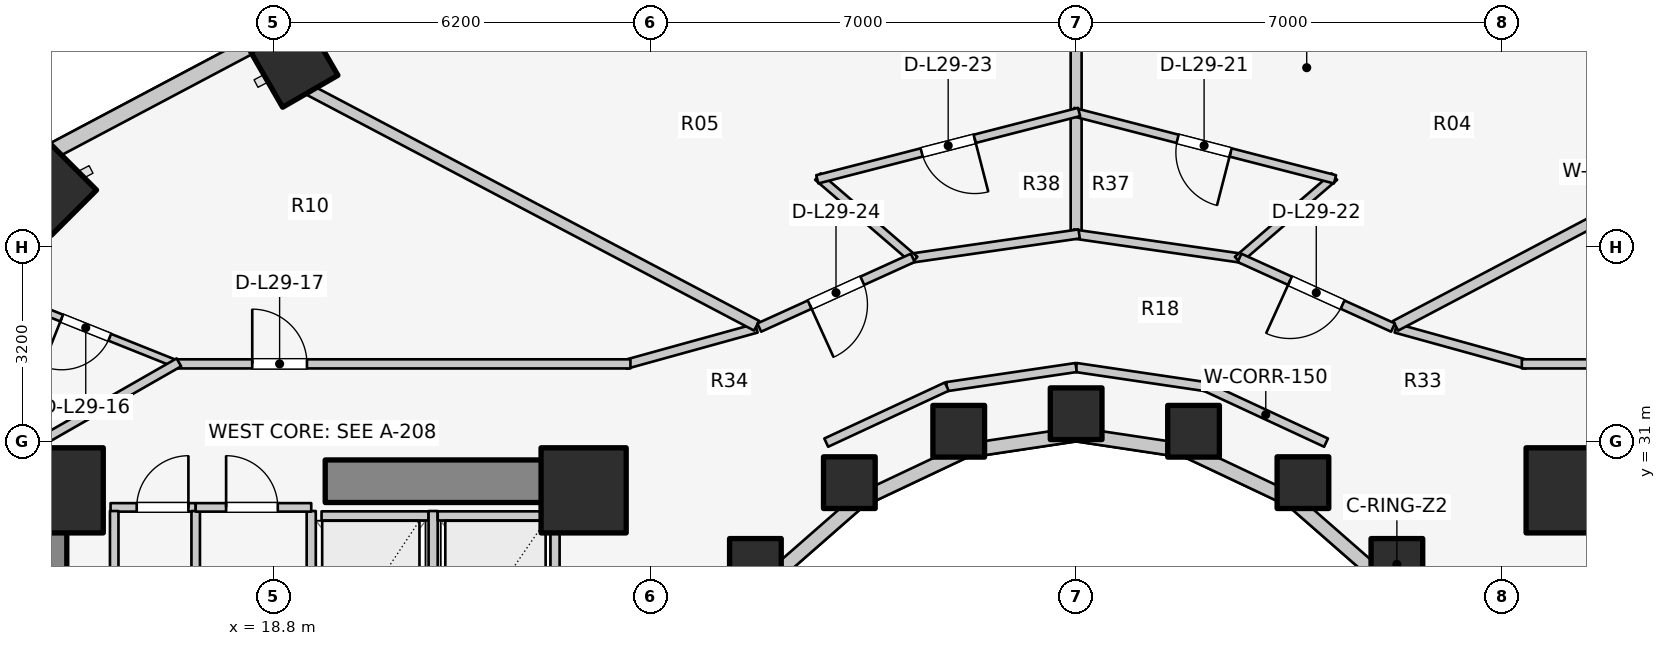
"""IFC4 building model, lengths in metres.
Left out: names, types, materials, properties, quantities, classifications, styles, units other than length and angle.
Written with IfcOpenShell. Run it as: python <this file> out.ifc"""

import sys

from ifc_helpers import new_model, si_unit, direction, frame, frame_2d, origin, origin_2d, place, context, subcontext, project, spatial, rectangle, extrude, element, fill, save


model = new_model("IFC4")
c1 = context("Model", 3, precision=1e-05, world=origin(), true_north=direction((0.0, 1.0)))
c2 = subcontext(c1, "Body", "Model", "MODEL_VIEW")
j1 = project(units=[si_unit("LENGTHUNIT", "METRE"), si_unit("PLANEANGLEUNIT", "RADIAN")], contexts=[c1])
p1 = place(None, origin())
s1 = spatial("IfcSite", under=j1, at=p1, CompositionType="ELEMENT")
p2 = place(p1, origin())
s2 = spatial("IfcBuilding", under=s1, at=p2, CompositionType="ELEMENT")
p3 = place(p2, frame((0.0, 0.0, 98.0)))
s3 = spatial("IfcBuildingStorey", under=s2, at=p3, CompositionType="ELEMENT", Elevation=98.0)
p4 = place(p3, frame((15.05, 17.05, 0.0), z_axis=(0.0, 0.0, 1.0), x_axis=(0.0, 1.0, 0.0)))
e1 = element("IfcWall", 1, at=p4, inside=s3, PredefinedType="SHEAR", context=c2, shape_type="SweptSolid", body=[
    extrude(rectangle(XDim=12.8, YDim=0.7, at=frame_2d((6.4, 0.0))), origin(), (0.0, 0.0, 1.0), 3.1),
])
for number, where, z_axis, x_axis in (
    (2, (19.65, 30.35, 0.0), (0.0, 0.0, 1.0), (1.0, 0.0, 0.0)),
    (3, (39.85, 30.35, 0.0), (0.0, 0.0, 1.0), (1.0, 0.0, 0.0)),
):
    element("IfcWall", number, at=place(p3, frame(where, z_axis=z_axis, x_axis=x_axis)), inside=s3, PredefinedType="SHEAR", context=c2, shape_type="SweptSolid", body=[
        extrude(rectangle(XDim=4.5, YDim=0.7, at=frame_2d((2.25, 0.0))), origin(), (0.0, 0.0, 1.0), 3.1),
    ])
for number, where, z_axis, x_axis in (
    (4, (23.9, 30.2, 0.0), (0.0, 0.0, 1.0), (1.0, 0.0, 0.0)),
    (5, (15.3, 30.2, 0.0), (0.0, 0.0, 1.0), (1.0, 0.0, 0.0)),
    (6, (40.1, 30.2, 0.0), (0.0, 0.0, 1.0), (1.0, 0.0, 0.0)),
):
    element("IfcColumn", number, at=place(p3, frame(where, z_axis=z_axis, x_axis=x_axis)), inside=s3, PredefinedType="COLUMN", context=c2, shape_type="SweptSolid", body=[
        extrude(rectangle(XDim=1.4, YDim=1.4, at=origin_2d()), origin(), (0.0, 0.0, 1.0), 3.1),
    ])
for number, where, z_axis, x_axis in (
    (7, (37.275, 28.982, 0.0), (0.0, 0.0, 1.0), (1.0, 0.0, 0.0)),
    (8, (35.73, 30.327, 0.0), (0.0, 0.0, 1.0), (1.0, 0.0, 0.0)),
    (9, (33.931, 31.172, 0.0), (0.0, 0.0, 1.0), (1.0, 0.0, 0.0)),
    (10, (32.0, 31.46, 0.0), (0.0, 0.0, 1.0), (1.0, 0.0, 0.0)),
    (11, (30.069, 31.172, 0.0), (0.0, 0.0, 1.0), (1.0, 0.0, 0.0)),
    (12, (28.27, 30.327, 0.0), (0.0, 0.0, 1.0), (1.0, 0.0, 0.0)),
):
    element("IfcColumn", number, at=place(p3, frame(where, z_axis=z_axis, x_axis=x_axis)), inside=s3, PredefinedType="COLUMN", context=c2, shape_type="SweptSolid", body=[
        extrude(rectangle(XDim=0.85, YDim=0.85, at=origin_2d()), origin(), (0.0, 0.0, 1.0), 3.1),
    ])
p5 = place(p3, frame((19.142, 37.218, 0.0), z_axis=(0.0, 0.0, 1.0), x_axis=(-0.5, 0.866025403784, 0.0)))
e13 = element("IfcColumn", 13, at=p5, inside=s3, PredefinedType="COLUMN", context=c2, shape_type="SweptSolid", body=[
    extrude(rectangle(XDim=1.05, YDim=1.05, at=origin_2d()), origin(), (0.0, 0.0, 1.0), 3.1),
])
p6 = place(p3, frame((26.725, 28.982, 0.0), z_axis=(0.0, 0.0, 1.0), x_axis=(1.0, 0.0, 0.0)))
e14 = element("IfcColumn", 14, at=p6, inside=s3, PredefinedType="COLUMN", context=c2, shape_type="SweptSolid", body=[
    extrude(rectangle(XDim=0.85, YDim=0.85, at=origin_2d()), origin(), (0.0, 0.0, 1.0), 3.1),
])
p7 = place(p3, frame((15.147, 35.138, 0.0), z_axis=(0.0, 0.0, 1.0), x_axis=(-0.707106781187, 0.707106781187, 0.0)))
e15 = element("IfcColumn", 15, at=p7, inside=s3, PredefinedType="COLUMN", context=c2, shape_type="SweptSolid", body=[
    extrude(rectangle(XDim=1.05, YDim=1.05, at=origin_2d()), origin(), (0.0, 0.0, 1.0), 3.1),
])
p8 = place(p3, frame((37.035, 28.742, 0.0), z_axis=(0.0, 0.0, 1.0), x_axis=(-0.752576694707, 0.658504607869, 0.0)))
e16 = element("IfcWall", 16, at=p8, inside=s3, PredefinedType="STANDARD", context=c2, shape_type="SweptSolid", body=[
    extrude(rectangle(XDim=1.959, YDim=0.23, at=frame_2d((0.98, 0.0))), origin(), (0.0, 0.0, 1.0), 2.16),
])
p9 = place(p3, frame((35.56, 30.032, 0.0), z_axis=(0.0, 0.0, 1.0), x_axis=(-0.904179699603, 0.427152280606, 0.0)))
e17 = element("IfcWall", 17, at=p9, inside=s3, PredefinedType="STANDARD", context=c2, shape_type="SweptSolid", body=[
    extrude(rectangle(XDim=1.899, YDim=0.23, at=frame_2d((0.95, 0.0))), origin(), (0.0, 0.0, 1.0), 2.16),
])
for number, where, z_axis, x_axis in (
    (18, (33.843, 30.843, 0.0), (0.0, 0.0, 1.0), (-0.989, 0.149, 0.0)),
    (19, (32.0, 31.12, 0.0), (0.0, 0.0, 1.0), (-0.989, -0.149, 0.0)),
):
    element("IfcWall", number, at=place(p3, frame(where, z_axis=z_axis, x_axis=x_axis)), inside=s3, PredefinedType="STANDARD", context=c2, shape_type="SweptSolid", body=[
        extrude(rectangle(XDim=1.864, YDim=0.23, at=frame_2d((0.932, 0.0))), origin(), (0.0, 0.0, 1.0), 2.16),
    ])
p10 = place(p3, frame((30.157, 30.843, 0.0), z_axis=(0.0, 0.0, 1.0), x_axis=(-0.904179699603, -0.427152280606, 0.0)))
e20 = element("IfcWall", 20, at=p10, inside=s3, PredefinedType="STANDARD", context=c2, shape_type="SweptSolid", body=[
    extrude(rectangle(XDim=1.899, YDim=0.23, at=frame_2d((0.95, 0.0))), origin(), (0.0, 0.0, 1.0), 2.16),
])
p11 = place(p3, frame((28.44, 30.032, 0.0), z_axis=(0.0, 0.0, 1.0), x_axis=(-0.752576694707, -0.658504607869, 0.0)))
e21 = element("IfcWall", 21, at=p11, inside=s3, PredefinedType="STANDARD", context=c2, shape_type="SweptSolid", body=[
    extrude(rectangle(XDim=1.959, YDim=0.23, at=frame_2d((0.98, 0.0))), origin(), (0.0, 0.0, 1.0), 2.16),
])
p12 = place(p3, frame((18.827, 37.721, 0.0), z_axis=(0.0, 0.0, 1.0), x_axis=(-0.883668636807, -0.4681129568, 0.0)))
e22 = element("IfcWall", 22, at=p12, inside=s3, PredefinedType="STANDARD", context=c2, shape_type="SweptSolid", body=[
    extrude(rectangle(XDim=4.631, YDim=0.26, at=frame_2d((2.316, 0.0))), origin(), (0.0, 0.0, 1.0), 2.85),
])
p13 = place(p3, frame((19.59, 29.78, 0.0), z_axis=(0.0, 0.0, 1.0), x_axis=(1.0, 0.0, 0.0)))
e23 = element("IfcWall", 23, at=p13, inside=s3, PredefinedType="SOLIDWALL", context=c2, shape_type="SweptSolid", body=[
    extrude(rectangle(XDim=1.76, YDim=0.15, at=frame_2d((0.88, 0.0))), origin(), (0.0, 0.0, 1.0), 2.855),
])
for number, where, z_axis, x_axis in (
    (24, (19.42, 27.14, 0.0), (0.0, 0.0, 1.0), (0.0, 1.0, 0.0)),
    (25, (21.425, 27.14, 0.0), (0.0, 0.0, 1.0), (0.0, 1.0, 0.0)),
):
    element("IfcWall", number, at=place(p3, frame(where, z_axis=z_axis, x_axis=x_axis)), inside=s3, PredefinedType="SOLIDWALL", context=c2, shape_type="SweptSolid", body=[
        extrude(rectangle(XDim=2.72, YDim=0.15, at=frame_2d((1.36, 0.0))), origin(), (0.0, 0.0, 1.0), 2.855),
    ])
p14 = place(p3, frame((21.5, 29.78, 0.0), z_axis=(0.0, 0.0, 1.0), x_axis=(1.0, 0.0, 0.0)))
e26 = element("IfcWall", 26, at=p14, inside=s3, PredefinedType="SOLIDWALL", context=c2, shape_type="SweptSolid", body=[
    extrude(rectangle(XDim=1.76, YDim=0.15, at=frame_2d((0.88, 0.0))), origin(), (0.0, 0.0, 1.0), 2.855),
])
p15 = place(p3, frame((23.43, 27.14, 0.0), z_axis=(0.0, 0.0, 1.0), x_axis=(0.0, 1.0, 0.0)))
e27 = element("IfcWall", 27, at=p15, inside=s3, PredefinedType="SOLIDWALL", context=c2, shape_type="SweptSolid", body=[
    extrude(rectangle(XDim=2.72, YDim=0.15, at=frame_2d((1.36, 0.0))), origin(), (0.0, 0.0, 1.0), 2.855),
])
p16 = place(p3, frame((16.12, 29.92, 0.0), z_axis=(0.0, 0.0, 1.0), x_axis=(1.0, 0.0, 0.0)))
e28 = element("IfcWall", 28, at=p16, inside=s3, PredefinedType="PLUMBINGWALL", context=c2, shape_type="SweptSolid", body=[
    extrude(rectangle(XDim=1.4, YDim=0.14, at=frame_2d((0.7, 0.0))), origin(), (0.0, 0.0, 1.0), 2.855),
])
p17 = place(p16, frame((0.43, 0.0, 0.0)))
e29 = element("IfcOpeningElement", 29, at=p17, cuts=e28, PredefinedType="OPENING", context=c2, shape_type="SweptSolid", body=[
    extrude(rectangle(XDim=0.85, YDim=2.05, at=frame_2d((0.425, 1.025))), frame((0.0, 0.08, 0.0), z_axis=(0.0, -1.0, 0.0), x_axis=(1.0, 0.0, 0.0)), (0.0, 0.0, 1.0), 0.16),
])
for number, where, z_axis, x_axis in (
    (30, (16.18, 25.98, 0.0), (0.0, 0.0, 1.0), (0.0, 1.0, 0.0)),
    (31, (17.52, 25.98, 0.0), (0.0, 0.0, 1.0), (0.0, 1.0, 0.0)),
):
    element("IfcWall", number, at=place(p3, frame(where, z_axis=z_axis, x_axis=x_axis)), inside=s3, PredefinedType="PLUMBINGWALL", context=c2, shape_type="SweptSolid", body=[
        extrude(rectangle(XDim=3.88, YDim=0.14, at=frame_2d((1.94, 0.0))), origin(), (0.0, 0.0, 1.0), 2.855),
    ])
p18 = place(p3, frame((17.52, 29.92, 0.0), z_axis=(0.0, 0.0, 1.0), x_axis=(1.0, 0.0, 0.0)))
e32 = element("IfcWall", 32, at=p18, inside=s3, PredefinedType="PLUMBINGWALL", context=c2, shape_type="SweptSolid", body=[
    extrude(rectangle(XDim=1.9, YDim=0.14, at=frame_2d((0.95, 0.0))), origin(), (0.0, 0.0, 1.0), 2.855),
])
p19 = place(p18, frame((0.5, 0.0, 0.0)))
e33 = element("IfcOpeningElement", 33, at=p19, cuts=e32, PredefinedType="OPENING", context=c2, shape_type="SweptSolid", body=[
    extrude(rectangle(XDim=0.85, YDim=2.05, at=frame_2d((0.425, 1.025))), frame((0.0, 0.08, 0.0), z_axis=(0.0, -1.0, 0.0), x_axis=(1.0, 0.0, 0.0)), (0.0, 0.0, 1.0), 0.16),
])
p20 = place(p3, frame((36.11, 30.985, 0.0), z_axis=(0.0, 0.0, 1.0), x_axis=(-0.906943449489, 0.421252393975, 0.0)))
e34 = element("IfcWall", 34, at=p20, inside=s3, PredefinedType="PARTITIONING", context=c2, shape_type="SweptSolid", body=[
    extrude(rectangle(XDim=2.186, YDim=0.15, at=frame_2d((1.093, 0.0))), origin(), (0.0, 0.0, 1.0), 2.272),
])
for number, where, z_axis, x_axis in (
    (35, (34.127, 31.906, 0.0), (0.0, 0.0, 1.0), (-0.989, 0.146, 0.0)),
    (36, (32.0, 32.22, 0.0), (0.0, 0.0, 1.0), (-0.989, -0.146, 0.0)),
):
    element("IfcWall", number, at=place(p3, frame(where, z_axis=z_axis, x_axis=x_axis)), inside=s3, PredefinedType="PARTITIONING", context=c2, shape_type="SweptSolid", body=[
        extrude(rectangle(XDim=2.151, YDim=0.15, at=frame_2d((1.075, 0.0))), origin(), (0.0, 0.0, 1.0), 2.272),
    ])
p21 = place(p3, frame((29.873, 31.906, 0.0), z_axis=(0.0, 0.0, 1.0), x_axis=(-0.906943449489, -0.421252393975, 0.0)))
e37 = element("IfcWall", 37, at=p21, inside=s3, PredefinedType="PARTITIONING", context=c2, shape_type="SweptSolid", body=[
    extrude(rectangle(XDim=2.186, YDim=0.15, at=frame_2d((1.093, 0.0))), origin(), (0.0, 0.0, 1.0), 2.272),
])
p22 = place(p3, frame((37.258, 32.867, 0.0), z_axis=(0.0, 0.0, 1.0), x_axis=(0.963833843713, -0.266503886865, 0.0)))
e38 = element("IfcWall", 38, at=p22, inside=s3, PredefinedType="PARTITIONING", context=c2, shape_type="SweptSolid", body=[
    extrude(rectangle(XDim=2.232, YDim=0.15, at=frame_2d((1.116, 0.0))), origin(), (0.0, 0.0, 1.0), 2.272),
])
p23 = place(p3, frame((39.33, 32.28, 0.0), z_axis=(0.0, 0.0, 1.0), x_axis=(1.0, 0.0, 0.0)))
e39 = element("IfcWall", 39, at=p23, inside=s3, PredefinedType="PARTITIONING", context=c2, shape_type="SweptSolid", body=[
    extrude(rectangle(XDim=7.52, YDim=0.15, at=frame_2d((3.76, 0.0))), origin(), (0.0, 0.0, 1.0), 2.272),
])
p24 = place(p23, frame((5.22, 0.0, 0.0)))
e40 = element("IfcOpeningElement", 40, at=p24, cuts=e39, PredefinedType="OPENING", context=c2, shape_type="SweptSolid", body=[
    extrude(rectangle(XDim=0.9, YDim=2.1, at=frame_2d((0.45, 1.05))), frame((0.0, 0.085, 0.0), z_axis=(0.0, -1.0, 0.0), x_axis=(1.0, 0.0, 0.0)), (0.0, 0.0, 1.0), 0.17),
])
p25 = place(p3, frame((17.246, 32.261, 0.0), z_axis=(0.0, 0.0, 1.0), x_axis=(-0.928511602422, 0.371303385614, 0.0)))
e41 = element("IfcWall", 41, at=p25, inside=s3, PredefinedType="MOVABLE", context=c2, shape_type="SweptSolid", body=[
    extrude(rectangle(XDim=4.822, YDim=0.12, at=frame_2d((2.411, 0.0))), origin(), (0.0, 0.0, 1.0), 2.142),
])
p26 = place(p25, frame((1.228, 0.0, 0.0)))
e42 = element("IfcOpeningElement", 42, at=p26, cuts=e41, PredefinedType="OPENING", context=c2, shape_type="SweptSolid", body=[
    extrude(rectangle(XDim=0.85, YDim=2.05, at=frame_2d((0.425, 1.025))), frame((0.0, 0.07, 0.0), z_axis=(0.0, -1.0, 0.0), x_axis=(1.0, 0.0, 0.0)), (0.0, 0.0, 1.0), 0.14),
])
p27 = place(p3, frame((26.742, 32.867, 0.0), z_axis=(0.0, 0.0, 1.0), x_axis=(-0.963833843713, -0.266503886865, 0.0)))
e43 = element("IfcWall", 43, at=p27, inside=s3, PredefinedType="PARTITIONING", context=c2, shape_type="SweptSolid", body=[
    extrude(rectangle(XDim=2.232, YDim=0.15, at=frame_2d((1.116, 0.0))), origin(), (0.0, 0.0, 1.0), 2.272),
])
p28 = place(p3, frame((17.15, 32.28, 0.0), z_axis=(0.0, 0.0, 1.0), x_axis=(1.0, 0.0, 0.0)))
e44 = element("IfcWall", 44, at=p28, inside=s3, PredefinedType="PARTITIONING", context=c2, shape_type="SweptSolid", body=[
    extrude(rectangle(XDim=7.52, YDim=0.15, at=frame_2d((3.76, 0.0))), origin(), (0.0, 0.0, 1.0), 2.272),
])
p29 = place(p28, frame((1.3, 0.0, 0.0)))
e45 = element("IfcOpeningElement", 45, at=p29, cuts=e44, PredefinedType="OPENING", context=c2, shape_type="SweptSolid", body=[
    extrude(rectangle(XDim=0.9, YDim=2.1, at=frame_2d((0.45, 1.05))), frame((0.0, 0.085, 0.0), z_axis=(0.0, -1.0, 0.0), x_axis=(1.0, 0.0, 0.0)), (0.0, 0.0, 1.0), 0.17),
])
p30 = place(p3, frame((17.243, 32.305, 0.0), z_axis=(0.0, 0.0, 1.0), x_axis=(-0.867991349648, -0.496579315857, 0.0)))
e46 = element("IfcWall", 46, at=p30, inside=s3, PredefinedType="PARTITIONING", context=c2, shape_type="SweptSolid", body=[
    extrude(rectangle(XDim=2.567, YDim=0.15, at=frame_2d((1.283, 0.0))), origin(), (0.0, 0.0, 1.0), 2.142),
])
p31 = place(p3, frame((37.254, 32.907, 0.0), z_axis=(0.0, 0.0, 1.0), x_axis=(0.884730147854, 0.466103599512, 0.0)))
e47 = element("IfcWall", 47, at=p31, inside=s3, PredefinedType="PARTITIONING", context=c2, shape_type="SweptSolid", body=[
    extrude(rectangle(XDim=8.31, YDim=0.18, at=frame_2d((4.155, 0.0))), origin(), (0.0, 0.0, 1.0), 2.272),
])
p32 = place(p3, frame((32.0, 34.465, 0.0), z_axis=(0.0, 0.0, 1.0), x_axis=(0.0, 1.0, 0.0)))
e48 = element("IfcWall", 48, at=p32, inside=s3, PredefinedType="PARTITIONING", context=c2, shape_type="SweptSolid", body=[
    extrude(rectangle(XDim=4.11, YDim=0.18, at=frame_2d((2.055, 0.0))), origin(), (0.0, 0.0, 1.0), 2.272),
])
p33 = place(p3, frame((26.746, 32.907, 0.0), z_axis=(0.0, 0.0, 1.0), x_axis=(-0.884730147854, 0.466103599512, 0.0)))
e49 = element("IfcWall", 49, at=p33, inside=s3, PredefinedType="PARTITIONING", context=c2, shape_type="SweptSolid", body=[
    extrude(rectangle(XDim=8.31, YDim=0.18, at=frame_2d((4.155, 0.0))), origin(), (0.0, 0.0, 1.0), 2.272),
])
p34 = place(p3, frame((34.744, 34.014, 0.0), z_axis=(0.0, 0.0, 1.0), x_axis=(-0.989761784218, 0.142729150844, 0.0)))
e50 = element("IfcWall", 50, at=p34, inside=s3, PredefinedType="PARTITIONING", context=c2, shape_type="SweptSolid", body=[
    extrude(rectangle(XDim=2.822, YDim=0.15, at=frame_2d((1.411, 0.0))), origin(), (0.0, 0.0, 1.0), 2.272),
])
p35 = place(p3, frame((34.656, 33.989, 0.0), z_axis=(0.0, 0.0, 1.0), x_axis=(0.757267205396, 0.653105182671, 0.0)))
e51 = element("IfcWall", 51, at=p35, inside=s3, PredefinedType="PLUMBINGWALL", context=c2, shape_type="SweptSolid", body=[
    extrude(rectangle(XDim=2.1, YDim=0.14, at=frame_2d((1.05, 0.0))), origin(), (0.0, 0.0, 1.0), 2.385),
])
p36 = place(p3, frame((36.257, 35.315, 0.0), z_axis=(0.0, 0.0, 1.0), x_axis=(-0.968452807179, 0.249197031015, 0.0)))
e52 = element("IfcWall", 52, at=p36, inside=s3, PredefinedType="PLUMBINGWALL", context=c2, shape_type="SweptSolid", body=[
    extrude(rectangle(XDim=4.446, YDim=0.14, at=frame_2d((2.223, 0.0))), origin(), (0.0, 0.0, 1.0), 2.272),
])
p37 = place(p36, frame((1.773, 0.0, 0.0)))
e53 = element("IfcOpeningElement", 53, at=p37, cuts=e52, PredefinedType="OPENING", context=c2, shape_type="SweptSolid", body=[
    extrude(rectangle(XDim=0.9, YDim=2.1, at=frame_2d((0.45, 1.05))), frame((0.0, 0.08, 0.0), z_axis=(0.0, -1.0, 0.0), x_axis=(1.0, 0.0, 0.0)), (0.0, 0.0, 1.0), 0.16),
])
p38 = place(p3, frame((37.211, 32.877, 0.0), z_axis=(0.0, 0.0, 1.0), x_axis=(-0.910568469686, 0.41335827319, 0.0)))
e54 = element("IfcWall", 54, at=p38, inside=s3, PredefinedType="PARTITIONING", context=c2, shape_type="SweptSolid", body=[
    extrude(rectangle(XDim=2.772, YDim=0.15, at=frame_2d((1.386, 0.0))), origin(), (0.0, 0.0, 1.0), 2.272),
])
p39 = place(p38, frame((0.911, 0.0, 0.0)))
e55 = element("IfcOpeningElement", 55, at=p39, cuts=e54, PredefinedType="OPENING", context=c2, shape_type="SweptSolid", body=[
    extrude(rectangle(XDim=0.95, YDim=2.1, at=frame_2d((0.475, 1.05))), frame((0.0, 0.085, 0.0), z_axis=(0.0, -1.0, 0.0), x_axis=(1.0, 0.0, 0.0)), (0.0, 0.0, 1.0), 0.17),
])
p40 = place(p3, frame((32.05, 34.417, 0.0), z_axis=(0.0, 0.0, 1.0), x_axis=(-0.989761784218, -0.142729150844, 0.0)))
e56 = element("IfcWall", 56, at=p40, inside=s3, PredefinedType="PARTITIONING", context=c2, shape_type="SweptSolid", body=[
    extrude(rectangle(XDim=2.822, YDim=0.15, at=frame_2d((1.411, 0.0))), origin(), (0.0, 0.0, 1.0), 2.272),
])
p41 = place(p3, frame((29.344, 33.989, 0.0), z_axis=(0.0, 0.0, 1.0), x_axis=(-0.757267205396, 0.653105182671, 0.0)))
e57 = element("IfcWall", 57, at=p41, inside=s3, PredefinedType="PLUMBINGWALL", context=c2, shape_type="SweptSolid", body=[
    extrude(rectangle(XDim=2.1, YDim=0.14, at=frame_2d((1.05, 0.0))), origin(), (0.0, 0.0, 1.0), 2.385),
])
p42 = place(p3, frame((32.048, 36.423, 0.0), z_axis=(0.0, 0.0, 1.0), x_axis=(-0.968452807179, -0.249197031015, 0.0)))
e58 = element("IfcWall", 58, at=p42, inside=s3, PredefinedType="PLUMBINGWALL", context=c2, shape_type="SweptSolid", body=[
    extrude(rectangle(XDim=4.446, YDim=0.14, at=frame_2d((2.223, 0.0))), origin(), (0.0, 0.0, 1.0), 2.272),
])
p43 = place(p42, frame((1.773, 0.0, 0.0)))
e59 = element("IfcOpeningElement", 59, at=p43, cuts=e58, PredefinedType="OPENING", context=c2, shape_type="SweptSolid", body=[
    extrude(rectangle(XDim=0.9, YDim=2.1, at=frame_2d((0.45, 1.05))), frame((0.0, 0.08, 0.0), z_axis=(0.0, -1.0, 0.0), x_axis=(1.0, 0.0, 0.0)), (0.0, 0.0, 1.0), 0.16),
])
p44 = place(p3, frame((29.313, 34.023, 0.0), z_axis=(0.0, 0.0, 1.0), x_axis=(-0.910568469686, -0.41335827319, 0.0)))
e60 = element("IfcWall", 60, at=p44, inside=s3, PredefinedType="PARTITIONING", context=c2, shape_type="SweptSolid", body=[
    extrude(rectangle(XDim=2.772, YDim=0.15, at=frame_2d((1.386, 0.0))), origin(), (0.0, 0.0, 1.0), 2.272),
])
p45 = place(p44, frame((0.911, 0.0, 0.0)))
e61 = element("IfcOpeningElement", 61, at=p45, cuts=e60, PredefinedType="OPENING", context=c2, shape_type="SweptSolid", body=[
    extrude(rectangle(XDim=0.95, YDim=2.1, at=frame_2d((0.475, 1.05))), frame((0.0, 0.085, 0.0), z_axis=(0.0, -1.0, 0.0), x_axis=(1.0, 0.0, 0.0)), (0.0, 0.0, 1.0), 0.17),
])
p46 = place(p17, origin())
e62 = element("IfcDoor", 62, at=p46, inside=s3, OperationType="SINGLE_SWING_RIGHT", PredefinedType="DOOR", context=c2, shape_type="SweptSolid", body=[
    extrude(rectangle(XDim=0.85, YDim=2.05, at=frame_2d((0.425, 1.025))), frame((0.0, 0.025, 0.0), z_axis=(0.0, -1.0, 0.0), x_axis=(1.0, 0.0, 0.0)), (0.0, 0.0, 1.0), 0.05),
])
fill(e29, e62)
p47 = place(p19, origin())
e63 = element("IfcDoor", 63, at=p47, inside=s3, OperationType="SINGLE_SWING_LEFT", PredefinedType="DOOR", context=c2, shape_type="SweptSolid", body=[
    extrude(rectangle(XDim=0.85, YDim=2.05, at=frame_2d((0.425, 1.025))), frame((0.0, 0.025, 0.0), z_axis=(0.0, -1.0, 0.0), x_axis=(1.0, 0.0, 0.0)), (0.0, 0.0, 1.0), 0.05),
])
fill(e33, e63)
p48 = place(p26, origin())
e64 = element("IfcDoor", 64, at=p48, inside=s3, OperationType="SINGLE_SWING_RIGHT", PredefinedType="DOOR", context=c2, shape_type="SweptSolid", body=[
    extrude(rectangle(XDim=0.85, YDim=2.05, at=frame_2d((0.425, 1.025))), frame((0.0, 0.025, 0.0), z_axis=(0.0, -1.0, 0.0), x_axis=(1.0, 0.0, 0.0)), (0.0, 0.0, 1.0), 0.05),
])
fill(e42, e64)
p49 = place(p29, origin())
e65 = element("IfcDoor", 65, at=p49, inside=s3, OperationType="SINGLE_SWING_LEFT", PredefinedType="DOOR", context=c2, shape_type="SweptSolid", body=[
    extrude(rectangle(XDim=0.9, YDim=2.1, at=frame_2d((0.45, 1.05))), frame((0.0, 0.025, 0.0), z_axis=(0.0, -1.0, 0.0), x_axis=(1.0, 0.0, 0.0)), (0.0, 0.0, 1.0), 0.05),
])
fill(e45, e65)
p50 = place(p37, origin())
e66 = element("IfcDoor", 66, at=p50, inside=s3, OperationType="SINGLE_SWING_LEFT", PredefinedType="DOOR", context=c2, shape_type="SweptSolid", body=[
    extrude(rectangle(XDim=0.9, YDim=2.1, at=frame_2d((0.45, 1.05))), frame((0.0, 0.025, 0.0), z_axis=(0.0, -1.0, 0.0), x_axis=(1.0, 0.0, 0.0)), (0.0, 0.0, 1.0), 0.05),
])
fill(e53, e66)
p51 = place(p39, origin())
e67 = element("IfcDoor", 67, at=p51, inside=s3, OperationType="SINGLE_SWING_RIGHT", PredefinedType="DOOR", context=c2, shape_type="SweptSolid", body=[
    extrude(rectangle(XDim=0.95, YDim=2.1, at=frame_2d((0.475, 1.05))), frame((0.0, 0.025, 0.0), z_axis=(0.0, -1.0, 0.0), x_axis=(1.0, 0.0, 0.0)), (0.0, 0.0, 1.0), 0.05),
])
fill(e55, e67)
p52 = place(p43, origin())
e68 = element("IfcDoor", 68, at=p52, inside=s3, OperationType="SINGLE_SWING_LEFT", PredefinedType="DOOR", context=c2, shape_type="SweptSolid", body=[
    extrude(rectangle(XDim=0.9, YDim=2.1, at=frame_2d((0.45, 1.05))), frame((0.0, 0.025, 0.0), z_axis=(0.0, -1.0, 0.0), x_axis=(1.0, 0.0, 0.0)), (0.0, 0.0, 1.0), 0.05),
])
fill(e59, e68)
p53 = place(p45, origin())
e69 = element("IfcDoor", 69, at=p53, inside=s3, OperationType="SINGLE_SWING_RIGHT", PredefinedType="DOOR", context=c2, shape_type="SweptSolid", body=[
    extrude(rectangle(XDim=0.95, YDim=2.1, at=frame_2d((0.475, 1.05))), frame((0.0, 0.025, 0.0), z_axis=(0.0, -1.0, 0.0), x_axis=(1.0, 0.0, 0.0)), (0.0, 0.0, 1.0), 0.05),
])
fill(e61, e69)
save(model, sys.argv[1])
